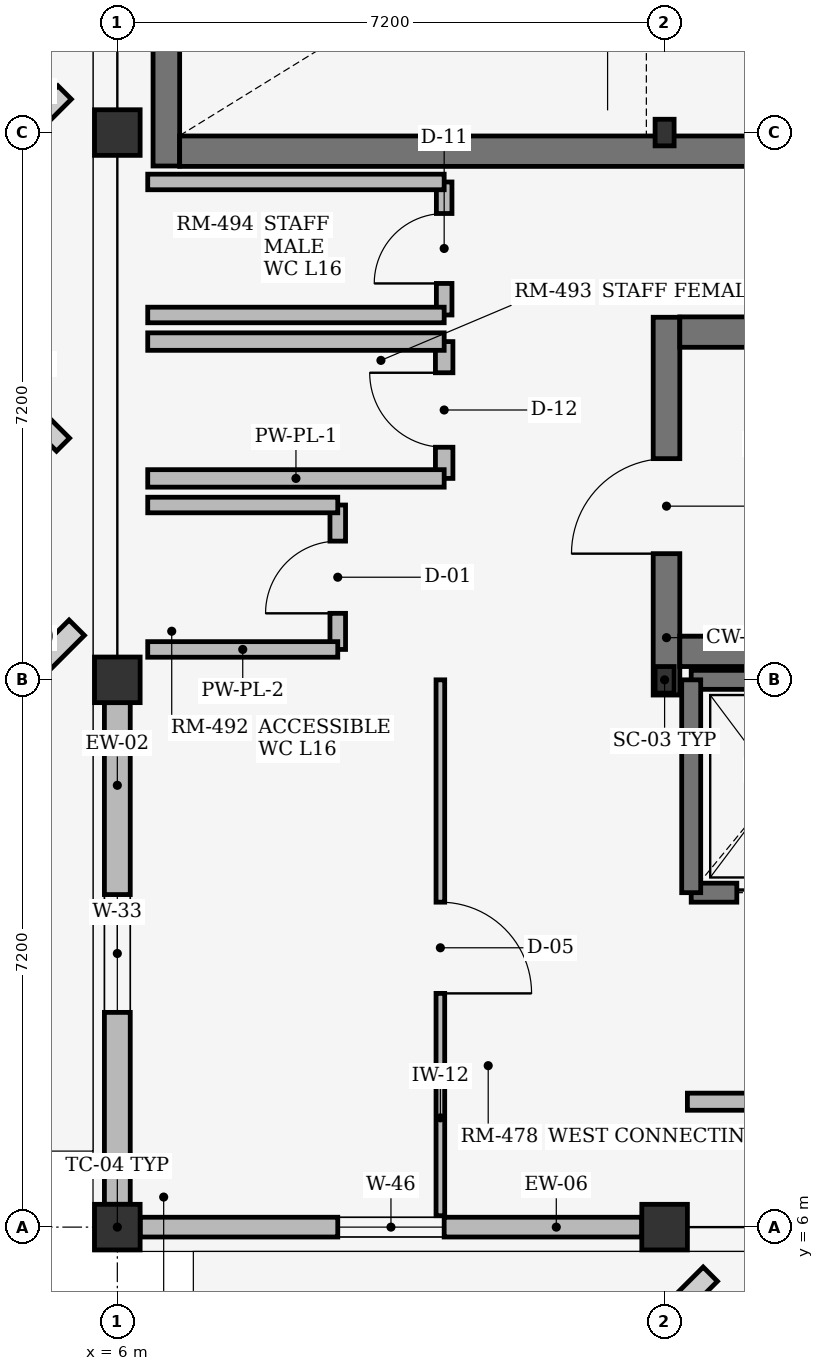
"""IFC4 building model, lengths in metres.
Left out: names, types, materials, properties, quantities, classifications, styles, units other than length and angle.
Written with IfcOpenShell. Run it as: python <this file> out.ifc"""

import sys

from ifc_helpers import new_model, si_unit, direction, frame, frame_2d, origin, origin_2d, place, context, subcontext, project, spatial, rectangle, i_section, extrude, element, fill, save


model = new_model("IFC4")
c1 = context("Model", 3, precision=1e-05, world=origin(), true_north=direction((0.0, 1.0)))
c2 = subcontext(c1, "Body", "Model", "MODEL_VIEW")
j1 = project(units=[si_unit("LENGTHUNIT", "METRE"), si_unit("PLANEANGLEUNIT", "RADIAN")], contexts=[c1])
p1 = place(None, origin())
s1 = spatial("IfcSite", under=j1, at=p1, CompositionType="ELEMENT")
p2 = place(p1, origin())
s2 = spatial("IfcBuilding", under=s1, at=p2, CompositionType="ELEMENT")
p3 = place(p2, frame((0.0, 0.0, 63.15)))
s3 = spatial("IfcBuildingStorey", under=s2, at=p3, CompositionType="ELEMENT", Elevation=63.15)
for number, where, z_axis, x_axis in (
    (1, (6.0, 6.0, 0.0), (0.0, 0.0, 1.0), (1.0, 0.0, 0.0)),
    (2, (6.0, 13.2, 0.0), (0.0, 0.0, 1.0), (1.0, 0.0, 0.0)),
    (3, (6.0, 20.4, 0.0), (0.0, 0.0, 1.0), (1.0, 0.0, 0.0)),
    (4, (13.2, 6.0, 0.0), (0.0, 0.0, 1.0), (1.0, 0.0, 0.0)),
):
    element("IfcColumn", number, at=place(p3, frame(where, z_axis=z_axis, x_axis=x_axis)), inside=s3, PredefinedType="COLUMN", context=c2, shape_type="SweptSolid", body=[
        extrude(rectangle(XDim=0.6, YDim=0.6, at=origin_2d()), origin(), (0.0, 0.0, 1.0), 3.49),
    ])
for number, where, z_axis, x_axis in (
    (5, (13.2, 13.2, 0.0), (0.0, 0.0, 1.0), (1.0, 0.0, 0.0)),
    (6, (13.2, 20.4, 0.0), (0.0, 0.0, 1.0), (1.0, 0.0, 0.0)),
):
    element("IfcColumn", number, at=place(p3, frame(where, z_axis=z_axis, x_axis=x_axis)), inside=s3, PredefinedType="COLUMN", context=c2, shape_type="SweptSolid", body=[
        extrude(i_section(OverallWidth=0.25, OverallDepth=0.35, WebThickness=0.01, FlangeThickness=0.012, at=origin_2d()), origin(), (0.0, 0.0, 1.0), 3.49),
    ])
p4 = place(p3, frame((6.3, 6.0, 0.0), z_axis=(0.0, 0.0, 1.0), x_axis=(1.0, 0.0, 0.0)))
e7 = element("IfcWall", 7, at=p4, inside=s3, PredefinedType="STANDARD", context=c2, shape_type="SweptSolid", body=[
    extrude(rectangle(XDim=6.6, YDim=0.26, at=frame_2d((3.3, 0.0))), origin(), (0.0, 0.0, 1.0), 3.07),
])
p5 = place(p4, frame((2.6, 0.0, 0.75)))
e8 = element("IfcOpeningElement", 8, at=p5, cuts=e7, PredefinedType="OPENING", context=c2, shape_type="SweptSolid", body=[
    extrude(rectangle(XDim=1.4, YDim=1.25, at=frame_2d((0.7, 0.625))), frame((0.0, 0.14, 0.0), z_axis=(0.0, -1.0, 0.0), x_axis=(1.0, 0.0, 0.0)), (0.0, 0.0, 1.0), 0.28),
])
p6 = place(p3, frame((6.0, 6.3, 0.0), z_axis=(0.0, 0.0, 1.0), x_axis=(0.0, 1.0, 0.0)))
e9 = element("IfcWall", 9, at=p6, inside=s3, PredefinedType="STANDARD", context=c2, shape_type="SweptSolid", body=[
    extrude(rectangle(XDim=6.6, YDim=0.34, at=frame_2d((3.3, 0.0))), origin(), (0.0, 0.0, 1.0), 3.07),
])
p7 = place(p6, frame((2.525, 0.0, 0.75)))
e10 = element("IfcOpeningElement", 10, at=p7, cuts=e9, PredefinedType="OPENING", context=c2, shape_type="SweptSolid", body=[
    extrude(rectangle(XDim=1.55, YDim=1.35, at=frame_2d((0.775, 0.675))), frame((0.0, 0.18, 0.0), z_axis=(0.0, -1.0, 0.0), x_axis=(1.0, 0.0, 0.0)), (0.0, 0.0, 1.0), 0.36),
])
p8 = place(p3, frame((13.225, 13.0, 0.0), z_axis=(0.0, 0.0, 1.0), x_axis=(0.0, 1.0, 0.0)))
e11 = element("IfcWall", 11, at=p8, inside=s3, PredefinedType="SHEAR", context=c2, shape_type="SweptSolid", body=[
    extrude(rectangle(XDim=4.97, YDim=0.35, at=frame_2d((2.485, 0.0))), origin(), (0.0, 0.0, 1.0), 3.49),
])
p9 = place(p8, frame((1.86, 0.0, 0.0)))
e12 = element("IfcOpeningElement", 12, at=p9, cuts=e11, PredefinedType="OPENING", context=c2, shape_type="SweptSolid", body=[
    extrude(rectangle(XDim=1.25, YDim=2.2, at=frame_2d((0.625, 1.1))), frame((0.0, 0.185, 0.0), z_axis=(0.0, -1.0, 0.0), x_axis=(1.0, 0.0, 0.0)), (0.0, 0.0, 1.0), 0.37),
])
for number, where, z_axis, x_axis in (
    (13, (13.4, 13.575, 0.0), (0.0, 0.0, 1.0), (1.0, 0.0, 0.0)),
    (14, (13.4, 17.775, 0.0), (0.0, 0.0, 1.0), (1.0, 0.0, 0.0)),
):
    element("IfcWall", number, at=place(p3, frame(where, z_axis=z_axis, x_axis=x_axis)), inside=s3, PredefinedType="SHEAR", context=c2, shape_type="SweptSolid", body=[
        extrude(rectangle(XDim=7.98, YDim=0.4, at=frame_2d((3.99, 0.0))), origin(), (0.0, 0.0, 1.0), 3.49),
    ])
p10 = place(p3, frame((6.645, 24.55, 0.0), z_axis=(0.0, 0.0, 1.0), x_axis=(0.0, -1.0, 0.0)))
e15 = element("IfcWall", 15, at=p10, inside=s3, PredefinedType="SHEAR", context=c2, shape_type="SweptSolid", body=[
    extrude(rectangle(XDim=4.59, YDim=0.35, at=frame_2d((2.295, 0.0))), origin(), (0.0, 0.0, 1.0), 3.49),
])
p11 = place(p3, frame((14.8, 20.155, 0.0), z_axis=(0.0, 0.0, 1.0), x_axis=(-1.0, 0.0, 0.0)))
e16 = element("IfcWall", 16, at=p11, inside=s3, PredefinedType="SHEAR", context=c2, shape_type="SweptSolid", body=[
    extrude(rectangle(XDim=7.98, YDim=0.4, at=frame_2d((3.99, 0.0))), origin(), (0.0, 0.0, 1.0), 3.49),
])
p12 = place(p3, frame((13.55, 10.4, 0.0), z_axis=(0.0, 0.0, 1.0), x_axis=(1.0, 0.0, 0.0)))
e17 = element("IfcWall", 17, at=p12, inside=s3, PredefinedType="SHEAR", context=c2, shape_type="SweptSolid", body=[
    extrude(rectangle(XDim=2.3, YDim=0.25, at=frame_2d((1.15, 0.0))), origin(), (0.0, 0.0, 1.0), 3.49),
])
p13 = place(p12, frame((0.6, 0.0, 0.0)))
e18 = element("IfcOpeningElement", 18, at=p13, cuts=e17, PredefinedType="OPENING", context=c2, shape_type="SweptSolid", body=[
    extrude(rectangle(XDim=1.1, YDim=2.2, at=frame_2d((0.55, 1.1))), frame((0.0, 0.135, 0.0), z_axis=(0.0, -1.0, 0.0), x_axis=(1.0, 0.0, 0.0)), (0.0, 0.0, 1.0), 0.27),
])
p14 = place(p3, frame((13.55, 13.2, 0.0), z_axis=(0.0, 0.0, 1.0), x_axis=(1.0, 0.0, 0.0)))
e19 = element("IfcWall", 19, at=p14, inside=s3, PredefinedType="SHEAR", context=c2, shape_type="SweptSolid", body=[
    extrude(rectangle(XDim=2.3, YDim=0.25, at=frame_2d((1.15, 0.0))), origin(), (0.0, 0.0, 1.0), 3.49),
])
p15 = place(p3, frame((13.55, 10.4, 0.0), z_axis=(0.0, 0.0, 1.0), x_axis=(0.0, 1.0, 0.0)))
e20 = element("IfcWall", 20, at=p15, inside=s3, PredefinedType="SHEAR", context=c2, shape_type="SweptSolid", body=[
    extrude(rectangle(XDim=2.8, YDim=0.25, at=frame_2d((1.4, 0.0))), origin(), (0.0, 0.0, 1.0), 3.49),
])
p16 = place(p3, frame((8.9, 13.6, 0.0), z_axis=(0.0, 0.0, 1.0), x_axis=(0.0, 1.0, 0.0)))
e21 = element("IfcWall", 21, at=p16, inside=s3, PredefinedType="PLUMBINGWALL", context=c2, shape_type="SweptSolid", body=[
    extrude(rectangle(XDim=1.9, YDim=0.205, at=frame_2d((0.95, 0.0))), origin(), (0.0, 0.0, 1.0), 3.47),
])
p17 = place(p16, frame((0.475, 0.0, 0.0)))
e22 = element("IfcOpeningElement", 22, at=p17, cuts=e21, PredefinedType="OPENING", context=c2, shape_type="SweptSolid", body=[
    extrude(rectangle(XDim=0.95, YDim=2.15, at=frame_2d((0.475, 1.075))), frame((0.0, 0.113, 0.0), z_axis=(0.0, -1.0, 0.0), x_axis=(1.0, 0.0, 0.0)), (0.0, 0.0, 1.0), 0.225),
])
for number, where, z_axis, x_axis in (
    (23, (6.4, 13.6, 0.0), (0.0, 0.0, 1.0), (1.0, 0.0, 0.0)),
    (24, (6.4, 15.5, 0.0), (0.0, 0.0, 1.0), (1.0, 0.0, 0.0)),
):
    element("IfcWall", number, at=place(p3, frame(where, z_axis=z_axis, x_axis=x_axis)), inside=s3, PredefinedType="PLUMBINGWALL", context=c2, shape_type="SweptSolid", body=[
        extrude(rectangle(XDim=2.5, YDim=0.205, at=frame_2d((1.25, 0.0))), origin(), (0.0, 0.0, 1.0), 3.47),
    ])
p18 = place(p3, frame((10.3, 15.85, 0.0), z_axis=(0.0, 0.0, 1.0), x_axis=(0.0, 1.0, 0.0)))
e25 = element("IfcWall", 25, at=p18, inside=s3, PredefinedType="PLUMBINGWALL", context=c2, shape_type="SweptSolid", body=[
    extrude(rectangle(XDim=1.8, YDim=0.23, at=frame_2d((0.9, 0.0))), origin(), (0.0, 0.0, 1.0), 3.47),
])
p19 = place(p18, frame((0.41, 0.0, 0.0)))
e26 = element("IfcOpeningElement", 26, at=p19, cuts=e25, PredefinedType="OPENING", context=c2, shape_type="SweptSolid", body=[
    extrude(rectangle(XDim=0.98, YDim=2.1, at=frame_2d((0.49, 1.05))), frame((0.0, 0.125, 0.0), z_axis=(0.0, -1.0, 0.0), x_axis=(1.0, 0.0, 0.0)), (0.0, 0.0, 1.0), 0.25),
])
for number, where, z_axis, x_axis in (
    (27, (6.4, 15.85, 0.0), (0.0, 0.0, 1.0), (1.0, 0.0, 0.0)),
    (28, (6.4, 17.65, 0.0), (0.0, 0.0, 1.0), (1.0, 0.0, 0.0)),
):
    element("IfcWall", number, at=place(p3, frame(where, z_axis=z_axis, x_axis=x_axis)), inside=s3, PredefinedType="PLUMBINGWALL", context=c2, shape_type="SweptSolid", body=[
        extrude(rectangle(XDim=3.9, YDim=0.23, at=frame_2d((1.95, 0.0))), origin(), (0.0, 0.0, 1.0), 3.47),
    ])
p20 = place(p3, frame((10.3, 18.0, 0.0), z_axis=(0.0, 0.0, 1.0), x_axis=(0.0, 1.0, 0.0)))
e29 = element("IfcWall", 29, at=p20, inside=s3, PredefinedType="PLUMBINGWALL", context=c2, shape_type="SweptSolid", body=[
    extrude(rectangle(XDim=1.75, YDim=0.205, at=frame_2d((0.875, 0.0))), origin(), (0.0, 0.0, 1.0), 3.47),
])
p21 = place(p20, frame((0.415, 0.0, 0.0)))
e30 = element("IfcOpeningElement", 30, at=p21, cuts=e29, PredefinedType="OPENING", context=c2, shape_type="SweptSolid", body=[
    extrude(rectangle(XDim=0.92, YDim=2.1, at=frame_2d((0.46, 1.05))), frame((0.0, 0.113, 0.0), z_axis=(0.0, -1.0, 0.0), x_axis=(1.0, 0.0, 0.0)), (0.0, 0.0, 1.0), 0.225),
])
for number, where, z_axis, x_axis in (
    (31, (6.4, 18.0, 0.0), (0.0, 0.0, 1.0), (1.0, 0.0, 0.0)),
    (32, (6.4, 19.75, 0.0), (0.0, 0.0, 1.0), (1.0, 0.0, 0.0)),
):
    element("IfcWall", number, at=place(p3, frame(where, z_axis=z_axis, x_axis=x_axis)), inside=s3, PredefinedType="PLUMBINGWALL", context=c2, shape_type="SweptSolid", body=[
        extrude(rectangle(XDim=3.9, YDim=0.205, at=frame_2d((1.95, 0.0))), origin(), (0.0, 0.0, 1.0), 3.47),
    ])
p22 = place(p3, frame((10.25, 6.15, 0.0), z_axis=(0.0, 0.0, 1.0), x_axis=(0.0, 1.0, 0.0)))
e33 = element("IfcWall", 33, at=p22, inside=s3, PredefinedType="PARTITIONING", context=c2, shape_type="SweptSolid", body=[
    extrude(rectangle(XDim=7.05, YDim=0.114, at=frame_2d((3.525, 0.0))), origin(), (0.0, 0.0, 1.0), 3.47),
])
p23 = place(p22, frame((2.925, 0.0, 0.0)))
e34 = element("IfcOpeningElement", 34, at=p23, cuts=e33, PredefinedType="OPENING", context=c2, shape_type="SweptSolid", body=[
    extrude(rectangle(XDim=1.2, YDim=2.2, at=frame_2d((0.6, 1.1))), frame((0.0, 0.067, 0.0), z_axis=(0.0, -1.0, 0.0), x_axis=(1.0, 0.0, 0.0)), (0.0, 0.0, 1.0), 0.134),
])
p24 = place(p3, frame((13.5, 7.65, 0.0), z_axis=(0.0, 0.0, 1.0), x_axis=(1.0, 0.0, 0.0)))
e35 = element("IfcWall", 35, at=p24, inside=s3, PredefinedType="SOLIDWALL", context=c2, shape_type="SweptSolid", body=[
    extrude(rectangle(XDim=10.8, YDim=0.225, at=frame_2d((5.4, 0.0))), origin(), (0.0, 0.0, 1.0), 3.47),
])
p25 = place(p24, frame((4.65, 0.0, 0.0)))
e36 = element("IfcOpeningElement", 36, at=p25, cuts=e35, PredefinedType="OPENING", context=c2, shape_type="SweptSolid", body=[
    extrude(rectangle(XDim=1.5, YDim=2.2, at=frame_2d((0.75, 1.1))), frame((0.0, 0.123, 0.0), z_axis=(0.0, -1.0, 0.0), x_axis=(1.0, 0.0, 0.0)), (0.0, 0.0, 1.0), 0.245),
])
p26 = place(p5, origin())
e37 = element("IfcWindow", 37, at=p26, inside=s3, PartitioningType="SINGLE_PANEL", PredefinedType="WINDOW", context=c2, shape_type="SweptSolid", body=[
    extrude(rectangle(XDim=1.4, YDim=1.25, at=frame_2d((0.7, 0.625))), frame((0.0, 0.03, 0.0), z_axis=(0.0, -1.0, 0.0), x_axis=(1.0, 0.0, 0.0)), (0.0, 0.0, 1.0), 0.06),
])
fill(e8, e37)
p27 = place(p7, origin())
e38 = element("IfcWindow", 38, at=p27, inside=s3, PartitioningType="SINGLE_PANEL", PredefinedType="WINDOW", context=c2, shape_type="SweptSolid", body=[
    extrude(rectangle(XDim=1.55, YDim=1.35, at=frame_2d((0.775, 0.675))), frame((0.0, 0.03, 0.0), z_axis=(0.0, -1.0, 0.0), x_axis=(1.0, 0.0, 0.0)), (0.0, 0.0, 1.0), 0.06),
])
fill(e10, e38)
p28 = place(p9, origin())
e39 = element("IfcDoor", 39, at=p28, inside=s3, OperationType="SINGLE_SWING_LEFT", PredefinedType="DOOR", context=c2, shape_type="SweptSolid", body=[
    extrude(rectangle(XDim=1.25, YDim=2.2, at=frame_2d((0.625, 1.1))), frame((0.0, 0.025, 0.0), z_axis=(0.0, -1.0, 0.0), x_axis=(1.0, 0.0, 0.0)), (0.0, 0.0, 1.0), 0.05),
])
fill(e12, e39)
p29 = place(p13, origin())
e40 = element("IfcDoor", 40, at=p29, inside=s3, OperationType="DOUBLE_DOOR_SLIDING", PredefinedType="DOOR", context=c2, shape_type="SweptSolid", body=[
    extrude(rectangle(XDim=1.1, YDim=2.2, at=frame_2d((0.55, 1.1))), frame((0.0, 0.025, 0.0), z_axis=(0.0, -1.0, 0.0), x_axis=(1.0, 0.0, 0.0)), (0.0, 0.0, 1.0), 0.05),
])
fill(e18, e40)
p30 = place(p17, origin())
e41 = element("IfcDoor", 41, at=p30, inside=s3, OperationType="SINGLE_SWING_LEFT", PredefinedType="DOOR", context=c2, shape_type="SweptSolid", body=[
    extrude(rectangle(XDim=0.95, YDim=2.15, at=frame_2d((0.475, 1.075))), frame((0.0, 0.025, 0.0), z_axis=(0.0, -1.0, 0.0), x_axis=(1.0, 0.0, 0.0)), (0.0, 0.0, 1.0), 0.05),
])
fill(e22, e41)
p31 = place(p19, frame((0.98, 0.0, 0.0), z_axis=(0.0, 0.0, 1.0), x_axis=(-1.0, 0.0, 0.0)))
e42 = element("IfcDoor", 42, at=p31, inside=s3, OperationType="SINGLE_SWING_RIGHT", PredefinedType="DOOR", context=c2, shape_type="SweptSolid", body=[
    extrude(rectangle(XDim=0.98, YDim=2.1, at=frame_2d((0.49, 1.05))), frame((0.0, 0.025, 0.0), z_axis=(0.0, -1.0, 0.0), x_axis=(1.0, 0.0, 0.0)), (0.0, 0.0, 1.0), 0.05),
])
fill(e26, e42)
p32 = place(p21, origin())
e43 = element("IfcDoor", 43, at=p32, inside=s3, OperationType="SINGLE_SWING_LEFT", PredefinedType="DOOR", context=c2, shape_type="SweptSolid", body=[
    extrude(rectangle(XDim=0.92, YDim=2.1, at=frame_2d((0.46, 1.05))), frame((0.0, 0.025, 0.0), z_axis=(0.0, -1.0, 0.0), x_axis=(1.0, 0.0, 0.0)), (0.0, 0.0, 1.0), 0.05),
])
fill(e30, e43)
p33 = place(p23, frame((1.2, 0.0, 0.0), z_axis=(0.0, 0.0, 1.0), x_axis=(-1.0, 0.0, 0.0)))
e44 = element("IfcDoor", 44, at=p33, inside=s3, OperationType="SINGLE_SWING_LEFT", PredefinedType="DOOR", context=c2, shape_type="SweptSolid", body=[
    extrude(rectangle(XDim=1.2, YDim=2.2, at=frame_2d((0.6, 1.1))), frame((0.0, 0.025, 0.0), z_axis=(0.0, -1.0, 0.0), x_axis=(1.0, 0.0, 0.0)), (0.0, 0.0, 1.0), 0.05),
])
fill(e34, e44)
save(model, sys.argv[1])
